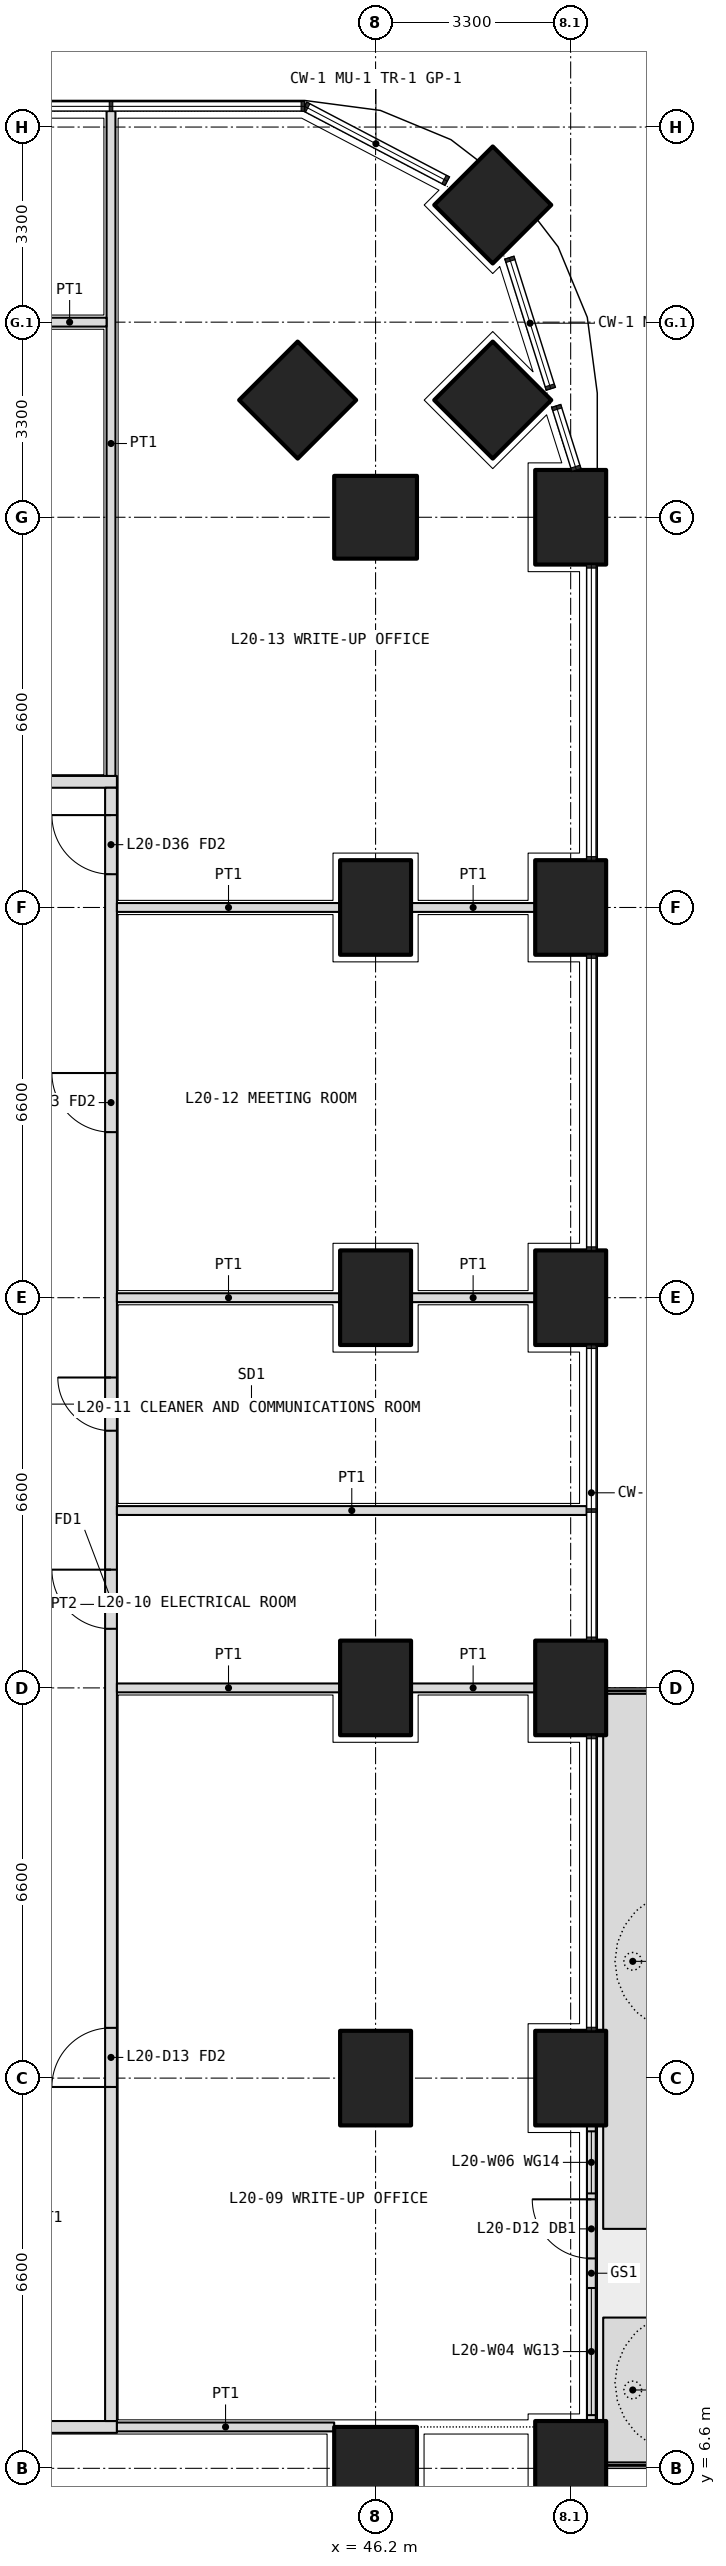
"""IFC4 building model, lengths in metres.
Left out: names, types, materials, properties, quantities, classifications, styles, units other than length and angle.
Written with IfcOpenShell. Run it as: python <this file> out.ifc"""

import sys

from ifc_helpers import new_model, si_unit, direction, frame, frame_2d, origin, origin_2d, place, context, subcontext, project, spatial, polyline, rectangle, outline, extrude, element, fill, save


model = new_model("IFC4")
c1 = context("Model", 3, precision=1e-05, world=origin(), true_north=direction((0.0, 1.0)))
c2 = subcontext(c1, "Body", "Model", "MODEL_VIEW")
j1 = project(units=[si_unit("LENGTHUNIT", "METRE"), si_unit("PLANEANGLEUNIT", "RADIAN")], contexts=[c1])
p1 = place(None, origin())
s1 = spatial("IfcSite", under=j1, at=p1, CompositionType="ELEMENT")
p2 = place(p1, origin())
s2 = spatial("IfcBuilding", under=s1, at=p2, CompositionType="ELEMENT")
p3 = place(p2, frame((0.0, 0.0, 90.6)))
s3 = spatial("IfcBuildingStorey", under=s2, at=p3, CompositionType="ELEMENT", Elevation=90.6)
p4 = place(p3, frame((48.182, 44.882, 0.0), z_axis=(0.0, 0.0, 1.0), x_axis=(0.707106781187, 0.707106781187, 0.0)))
e1 = element("IfcColumn", 1, at=p4, inside=s3, PredefinedType="COLUMN", context=c2, shape_type="SweptSolid", body=[
    extrude(rectangle(XDim=1.4, YDim=1.4, at=origin_2d()), origin(), (0.0, 0.0, 1.0), 4.2),
])
for number, where, z_axis, x_axis in (
    (2, (49.5, 6.6, 0.0), (0.0, 0.0, 1.0), (0.0, 1.0, 0.0)),
    (3, (49.5, 13.2, 0.0), (0.0, 0.0, 1.0), (0.0, 1.0, 0.0)),
    (4, (49.5, 19.8, 0.0), (0.0, 0.0, 1.0), (0.0, 1.0, 0.0)),
    (5, (49.5, 26.4, 0.0), (0.0, 0.0, 1.0), (0.0, 1.0, 0.0)),
    (6, (49.5, 33.0, 0.0), (0.0, 0.0, 1.0), (0.0, 1.0, 0.0)),
    (7, (49.5, 39.6, 0.0), (0.0, 0.0, 1.0), (0.0, 1.0, 0.0)),
):
    element("IfcColumn", number, at=place(p3, frame(where, z_axis=z_axis, x_axis=x_axis)), inside=s3, PredefinedType="COLUMN", context=c2, shape_type="SweptSolid", body=[
        extrude(rectangle(XDim=1.6, YDim=1.2, at=origin_2d()), origin(), (0.0, 0.0, 1.0), 4.2),
    ])
for number, where, z_axis, x_axis in (
    (8, (46.2, 6.6, 0.0), (0.0, 0.0, 1.0), (1.0, 0.0, 0.0)),
    (9, (46.2, 39.6, 0.0), (0.0, 0.0, 1.0), (1.0, 0.0, 0.0)),
    (10, (48.182, 41.582, 0.0), (0.0, 0.0, 1.0), (0.707, 0.707, 0.0)),
    (11, (44.882, 41.582, 0.0), (0.0, 0.0, 1.0), (0.707, 0.707, 0.0)),
):
    element("IfcColumn", number, at=place(p3, frame(where, z_axis=z_axis, x_axis=x_axis)), inside=s3, PredefinedType="COLUMN", context=c2, shape_type="SweptSolid", body=[
        extrude(rectangle(XDim=1.4, YDim=1.4, at=origin_2d()), origin(), (0.0, 0.0, 1.0), 4.2),
    ])
for number, where, z_axis, x_axis in (
    (12, (46.2, 13.2, 0.0), (0.0, 0.0, 1.0), (0.0, 1.0, 0.0)),
    (13, (46.2, 19.8, 0.0), (0.0, 0.0, 1.0), (0.0, 1.0, 0.0)),
    (14, (46.2, 26.4, 0.0), (0.0, 0.0, 1.0), (0.0, 1.0, 0.0)),
    (15, (46.2, 33.0, 0.0), (0.0, 0.0, 1.0), (0.0, 1.0, 0.0)),
):
    element("IfcColumn", number, at=place(p3, frame(where, z_axis=z_axis, x_axis=x_axis)), inside=s3, PredefinedType="COLUMN", context=c2, shape_type="SweptSolid", body=[
        extrude(rectangle(XDim=1.6, YDim=1.2, at=origin_2d()), origin(), (0.0, 0.0, 1.0), 4.2),
    ])
p5 = place(p3, origin())
e16 = element("IfcWall", 16, at=p5, inside=s3, PredefinedType="USERDEFINED", context=c2, shape_type="SweptSolid", body=[
    extrude(outline(polyline([(50.05, 6.7), (51.05, 6.7), (51.05, 9.15), (50.05, 9.15), (50.05, 6.7)]), holes=[polyline([(50.2, 6.85), (50.9, 6.85), (50.9, 9.0), (50.2, 9.0), (50.2, 6.85)])]), origin(), (0.0, 0.0, 1.0), 1.05),
])
p6 = place(p3, origin())
e17 = element("IfcWall", 17, at=p6, inside=s3, PredefinedType="USERDEFINED", context=c2, shape_type="SweptSolid", body=[
    extrude(outline(polyline([(50.05, 10.65), (51.05, 10.65), (51.05, 19.7), (50.05, 19.7), (50.05, 10.65)]), holes=[polyline([(50.2, 10.8), (50.9, 10.8), (50.9, 19.55), (50.2, 19.55), (50.2, 10.8)])]), origin(), (0.0, 0.0, 1.0), 1.05),
])
p7 = place(p3, frame((49.85, 7.4, 0.0), z_axis=(0.0, 0.0, 1.0), x_axis=(0.0, 1.0, 0.0)))
e18 = element("IfcWall", 18, at=p7, inside=s3, PredefinedType="SOLIDWALL", context=c2, shape_type="SweptSolid", body=[
    extrude(rectangle(XDim=5.0, YDim=0.15, at=frame_2d((2.5, 0.0))), origin(), (0.0, 0.0, 1.0), 2.7),
])
p8 = place(p7, frame((2.75, 0.0, 0.0)))
e19 = element("IfcOpeningElement", 19, at=p8, cuts=e18, PredefinedType="OPENING", context=c2, shape_type="SweptSolid", body=[
    extrude(rectangle(XDim=1.0, YDim=2.4, at=frame_2d((0.5, 1.2))), frame((0.0, 0.085, 0.0), z_axis=(0.0, -1.0, 0.0), x_axis=(1.0, 0.0, 0.0)), (0.0, 0.0, 1.0), 0.17),
])
p9 = place(p7, frame((0.1, 0.0, 0.1)))
e20 = element("IfcOpeningElement", 20, at=p9, cuts=e18, PredefinedType="OPENING", context=c2, shape_type="SweptSolid", body=[
    extrude(rectangle(XDim=2.15, YDim=2.3, at=frame_2d((1.075, 1.15))), frame((0.0, 0.085, 0.0), z_axis=(0.0, -1.0, 0.0), x_axis=(1.0, 0.0, 0.0)), (0.0, 0.0, 1.0), 0.17),
])
p10 = place(p7, frame((3.85, 0.0, 0.1)))
e21 = element("IfcOpeningElement", 21, at=p10, cuts=e18, PredefinedType="OPENING", context=c2, shape_type="SweptSolid", body=[
    extrude(rectangle(XDim=1.05, YDim=2.3, at=frame_2d((0.525, 1.15))), frame((0.0, 0.085, 0.0), z_axis=(0.0, -1.0, 0.0), x_axis=(1.0, 0.0, 0.0)), (0.0, 0.0, 1.0), 0.17),
])
p11 = place(p3, frame((26.4, 7.3, 0.0), z_axis=(0.0, 0.0, 1.0), x_axis=(1.0, 0.0, 0.0)))
e22 = element("IfcWall", 22, at=p11, inside=s3, PredefinedType="PARTITIONING", context=c2, shape_type="SweptSolid", body=[
    extrude(rectangle(XDim=15.425, YDim=0.2, at=frame_2d((7.712, 0.0))), origin(), (0.0, 0.0, 1.0), 2.85),
])
p12 = place(p11, frame((7.163, 0.0, 0.0)))
e23 = element("IfcOpeningElement", 23, at=p12, cuts=e22, PredefinedType="OPENING", context=c2, shape_type="SweptSolid", body=[
    extrude(rectangle(XDim=1.0, YDim=2.1, at=frame_2d((0.5, 1.05))), frame((0.0, 0.11, 0.0), z_axis=(0.0, -1.0, 0.0), x_axis=(1.0, 0.0, 0.0)), (0.0, 0.0, 1.0), 0.22),
])
p13 = place(p3, frame((10.975, 35.125, 0.0), z_axis=(0.0, 0.0, 1.0), x_axis=(1.0, 0.0, 0.0)))
e24 = element("IfcWall", 24, at=p13, inside=s3, PredefinedType="PARTITIONING", context=c2, shape_type="SweptSolid", body=[
    extrude(rectangle(XDim=30.85, YDim=0.2, at=frame_2d((15.425, 0.0))), origin(), (0.0, 0.0, 1.0), 2.85),
])
p14 = place(p13, frame((3.962, 0.0, 0.0)))
e25 = element("IfcOpeningElement", 25, at=p14, cuts=e24, PredefinedType="OPENING", context=c2, shape_type="SweptSolid", body=[
    extrude(rectangle(XDim=1.0, YDim=2.1, at=frame_2d((0.5, 1.05))), frame((0.0, 0.11, 0.0), z_axis=(0.0, -1.0, 0.0), x_axis=(1.0, 0.0, 0.0)), (0.0, 0.0, 1.0), 0.22),
])
p15 = place(p13, frame((9.975, 0.0, 0.0)))
e26 = element("IfcOpeningElement", 26, at=p15, cuts=e24, PredefinedType="OPENING", context=c2, shape_type="SweptSolid", body=[
    extrude(rectangle(XDim=1.0, YDim=2.1, at=frame_2d((0.5, 1.05))), frame((0.0, 0.11, 0.0), z_axis=(0.0, -1.0, 0.0), x_axis=(1.0, 0.0, 0.0)), (0.0, 0.0, 1.0), 0.22),
])
p16 = place(p13, frame((14.825, 0.0, 0.0)))
e27 = element("IfcOpeningElement", 27, at=p16, cuts=e24, PredefinedType="OPENING", context=c2, shape_type="SweptSolid", body=[
    extrude(rectangle(XDim=1.2, YDim=2.1, at=frame_2d((0.6, 1.05))), frame((0.0, 0.11, 0.0), z_axis=(0.0, -1.0, 0.0), x_axis=(1.0, 0.0, 0.0)), (0.0, 0.0, 1.0), 0.22),
])
p17 = place(p13, frame((24.238, 0.0, 0.0)))
e28 = element("IfcOpeningElement", 28, at=p17, cuts=e24, PredefinedType="OPENING", context=c2, shape_type="SweptSolid", body=[
    extrude(rectangle(XDim=1.0, YDim=2.1, at=frame_2d((0.5, 1.05))), frame((0.0, 0.11, 0.0), z_axis=(0.0, -1.0, 0.0), x_axis=(1.0, 0.0, 0.0)), (0.0, 0.0, 1.0), 0.22),
])
p18 = place(p3, frame((41.725, 7.4, 0.0), z_axis=(0.0, 0.0, 1.0), x_axis=(0.0, 1.0, 0.0)))
e29 = element("IfcWall", 29, at=p18, inside=s3, PredefinedType="PARTITIONING", context=c2, shape_type="SweptSolid", body=[
    extrude(rectangle(XDim=27.625, YDim=0.2, at=frame_2d((13.812, 0.0))), origin(), (0.0, 0.0, 1.0), 2.85),
])
p19 = place(p18, frame((5.65, 0.0, 0.0)))
e30 = element("IfcOpeningElement", 30, at=p19, cuts=e29, PredefinedType="OPENING", context=c2, shape_type="SweptSolid", body=[
    extrude(rectangle(XDim=1.0, YDim=2.1, at=frame_2d((0.5, 1.05))), frame((0.0, 0.11, 0.0), z_axis=(0.0, -1.0, 0.0), x_axis=(1.0, 0.0, 0.0)), (0.0, 0.0, 1.0), 0.22),
])
p20 = place(p18, frame((13.4, 0.0, 0.0)))
e31 = element("IfcOpeningElement", 31, at=p20, cuts=e29, PredefinedType="OPENING", context=c2, shape_type="SweptSolid", body=[
    extrude(rectangle(XDim=1.0, YDim=2.1, at=frame_2d((0.5, 1.05))), frame((0.0, 0.11, 0.0), z_axis=(0.0, -1.0, 0.0), x_axis=(1.0, 0.0, 0.0)), (0.0, 0.0, 1.0), 0.22),
])
p21 = place(p18, frame((16.75, 0.0, 0.0)))
e32 = element("IfcOpeningElement", 32, at=p21, cuts=e29, PredefinedType="OPENING", context=c2, shape_type="SweptSolid", body=[
    extrude(rectangle(XDim=0.9, YDim=2.1, at=frame_2d((0.45, 1.05))), frame((0.0, 0.11, 0.0), z_axis=(0.0, -1.0, 0.0), x_axis=(1.0, 0.0, 0.0)), (0.0, 0.0, 1.0), 0.22),
])
p22 = place(p18, frame((21.8, 0.0, 0.0)))
e33 = element("IfcOpeningElement", 33, at=p22, cuts=e29, PredefinedType="OPENING", context=c2, shape_type="SweptSolid", body=[
    extrude(rectangle(XDim=1.0, YDim=2.1, at=frame_2d((0.5, 1.05))), frame((0.0, 0.11, 0.0), z_axis=(0.0, -1.0, 0.0), x_axis=(1.0, 0.0, 0.0)), (0.0, 0.0, 1.0), 0.22),
])
p23 = place(p18, frame((26.163, 0.0, 0.0)))
e34 = element("IfcOpeningElement", 34, at=p23, cuts=e29, PredefinedType="OPENING", context=c2, shape_type="SweptSolid", body=[
    extrude(rectangle(XDim=1.0, YDim=2.1, at=frame_2d((0.5, 1.05))), frame((0.0, 0.11, 0.0), z_axis=(0.0, -1.0, 0.0), x_axis=(1.0, 0.0, 0.0)), (0.0, 0.0, 1.0), 0.22),
])
p24 = place(p3, frame((45.5, 7.3, 0.0), z_axis=(0.0, 0.0, 1.0), x_axis=(-1.0, 0.0, 0.0)))
e35 = element("IfcWall", 35, at=p24, inside=s3, PredefinedType="PARTITIONING", context=c2, shape_type="SweptSolid", body=[
    extrude(rectangle(XDim=3.675, YDim=0.15, at=frame_2d((1.837, 0.0))), origin(), (0.0, 0.0, 1.0), 2.85),
])
p25 = place(p3, frame((41.725, 46.47, 0.0), z_axis=(0.0, 0.0, 1.0), x_axis=(0.0, -1.0, 0.0)))
e36 = element("IfcWall", 36, at=p25, inside=s3, PredefinedType="PARTITIONING", context=c2, shape_type="SweptSolid", body=[
    extrude(rectangle(XDim=11.245, YDim=0.15, at=frame_2d((5.623, 0.0))), origin(), (0.0, 0.0, 1.0), 2.7),
])
p26 = place(p3, frame((49.77, 22.8, 0.0), z_axis=(0.0, 0.0, 1.0), x_axis=(-1.0, 0.0, 0.0)))
e37 = element("IfcWall", 37, at=p26, inside=s3, PredefinedType="PARTITIONING", context=c2, shape_type="SweptSolid", body=[
    extrude(rectangle(XDim=7.945, YDim=0.15, at=frame_2d((3.973, 0.0))), origin(), (0.0, 0.0, 1.0), 2.7),
])
p27 = place(p3, frame((48.9, 26.4, 0.0), z_axis=(0.0, 0.0, 1.0), x_axis=(-1.0, 0.0, 0.0)))
e38 = element("IfcWall", 38, at=p27, inside=s3, PredefinedType="PARTITIONING", context=c2, shape_type="SweptSolid", body=[
    extrude(rectangle(XDim=2.1, YDim=0.15, at=frame_2d((1.05, 0.0))), origin(), (0.0, 0.0, 1.0), 2.85),
])
p28 = place(p3, frame((45.6, 26.4, 0.0), z_axis=(0.0, 0.0, 1.0), x_axis=(-1.0, 0.0, 0.0)))
e39 = element("IfcWall", 39, at=p28, inside=s3, PredefinedType="PARTITIONING", context=c2, shape_type="SweptSolid", body=[
    extrude(rectangle(XDim=3.775, YDim=0.15, at=frame_2d((1.888, 0.0))), origin(), (0.0, 0.0, 1.0), 2.85),
])
p29 = place(p3, frame((48.9, 19.8, 0.0), z_axis=(0.0, 0.0, 1.0), x_axis=(-1.0, 0.0, 0.0)))
e40 = element("IfcWall", 40, at=p29, inside=s3, PredefinedType="PARTITIONING", context=c2, shape_type="SweptSolid", body=[
    extrude(rectangle(XDim=2.1, YDim=0.15, at=frame_2d((1.05, 0.0))), origin(), (0.0, 0.0, 1.0), 2.85),
])
p30 = place(p3, frame((45.6, 19.8, 0.0), z_axis=(0.0, 0.0, 1.0), x_axis=(-1.0, 0.0, 0.0)))
e41 = element("IfcWall", 41, at=p30, inside=s3, PredefinedType="PARTITIONING", context=c2, shape_type="SweptSolid", body=[
    extrude(rectangle(XDim=3.775, YDim=0.15, at=frame_2d((1.888, 0.0))), origin(), (0.0, 0.0, 1.0), 2.85),
])
p31 = place(p3, frame((48.9, 33.0, 0.0), z_axis=(0.0, 0.0, 1.0), x_axis=(-1.0, 0.0, 0.0)))
e42 = element("IfcWall", 42, at=p31, inside=s3, PredefinedType="PARTITIONING", context=c2, shape_type="SweptSolid", body=[
    extrude(rectangle(XDim=2.1, YDim=0.15, at=frame_2d((1.05, 0.0))), origin(), (0.0, 0.0, 1.0), 2.85),
])
p32 = place(p3, frame((45.6, 33.0, 0.0), z_axis=(0.0, 0.0, 1.0), x_axis=(-1.0, 0.0, 0.0)))
e43 = element("IfcWall", 43, at=p32, inside=s3, PredefinedType="PARTITIONING", context=c2, shape_type="SweptSolid", body=[
    extrude(rectangle(XDim=3.775, YDim=0.15, at=frame_2d((1.888, 0.0))), origin(), (0.0, 0.0, 1.0), 2.85),
])
p33 = place(p3, frame((41.65, 42.9, 0.0), z_axis=(0.0, 0.0, 1.0), x_axis=(-1.0, 0.0, 0.0)))
e44 = element("IfcWall", 44, at=p33, inside=s3, PredefinedType="PARTITIONING", context=c2, shape_type="SweptSolid", body=[
    extrude(rectangle(XDim=1.25, YDim=0.15, at=frame_2d((0.625, 0.0))), origin(), (0.0, 0.0, 1.0), 3.9),
])
p34 = place(p8, origin())
e45 = element("IfcDoor", 45, at=p34, inside=s3, OperationType="SINGLE_SWING_RIGHT", PredefinedType="DOOR", context=c2, shape_type="SweptSolid", body=[
    extrude(rectangle(XDim=1.0, YDim=2.4, at=frame_2d((0.5, 1.2))), frame((0.0, 0.025, 0.0), z_axis=(0.0, -1.0, 0.0), x_axis=(1.0, 0.0, 0.0)), (0.0, 0.0, 1.0), 0.05),
])
fill(e19, e45)
p35 = place(p9, origin())
e46 = element("IfcWindow", 46, at=p35, inside=s3, PartitioningType="SINGLE_PANEL", PredefinedType="WINDOW", context=c2, shape_type="SweptSolid", body=[
    extrude(rectangle(XDim=2.15, YDim=2.3, at=frame_2d((1.075, 1.15))), frame((0.0, 0.03, 0.0), z_axis=(0.0, -1.0, 0.0), x_axis=(1.0, 0.0, 0.0)), (0.0, 0.0, 1.0), 0.06),
])
fill(e20, e46)
p36 = place(p10, origin())
e47 = element("IfcWindow", 47, at=p36, inside=s3, PartitioningType="SINGLE_PANEL", PredefinedType="WINDOW", context=c2, shape_type="SweptSolid", body=[
    extrude(rectangle(XDim=1.05, YDim=2.3, at=frame_2d((0.525, 1.15))), frame((0.0, 0.03, 0.0), z_axis=(0.0, -1.0, 0.0), x_axis=(1.0, 0.0, 0.0)), (0.0, 0.0, 1.0), 0.06),
])
fill(e21, e47)
p37 = place(p19, origin())
e48 = element("IfcDoor", 48, at=p37, inside=s3, OperationType="SINGLE_SWING_LEFT", PredefinedType="DOOR", context=c2, shape_type="SweptSolid", body=[
    extrude(rectangle(XDim=1.0, YDim=2.1, at=frame_2d((0.5, 1.05))), frame((0.0, 0.025, 0.0), z_axis=(0.0, -1.0, 0.0), x_axis=(1.0, 0.0, 0.0)), (0.0, 0.0, 1.0), 0.05),
])
fill(e30, e48)
p38 = place(p20, origin())
e49 = element("IfcDoor", 49, at=p38, inside=s3, OperationType="SINGLE_SWING_RIGHT", PredefinedType="DOOR", context=c2, shape_type="SweptSolid", body=[
    extrude(rectangle(XDim=1.0, YDim=2.1, at=frame_2d((0.5, 1.05))), frame((0.0, 0.025, 0.0), z_axis=(0.0, -1.0, 0.0), x_axis=(1.0, 0.0, 0.0)), (0.0, 0.0, 1.0), 0.05),
])
fill(e31, e49)
p39 = place(p21, origin())
e50 = element("IfcDoor", 50, at=p39, inside=s3, OperationType="SINGLE_SWING_RIGHT", PredefinedType="DOOR", context=c2, shape_type="SweptSolid", body=[
    extrude(rectangle(XDim=0.9, YDim=2.1, at=frame_2d((0.45, 1.05))), frame((0.0, 0.025, 0.0), z_axis=(0.0, -1.0, 0.0), x_axis=(1.0, 0.0, 0.0)), (0.0, 0.0, 1.0), 0.05),
])
fill(e32, e50)
p40 = place(p22, origin())
e51 = element("IfcDoor", 51, at=p40, inside=s3, OperationType="SINGLE_SWING_RIGHT", PredefinedType="DOOR", context=c2, shape_type="SweptSolid", body=[
    extrude(rectangle(XDim=1.0, YDim=2.1, at=frame_2d((0.5, 1.05))), frame((0.0, 0.025, 0.0), z_axis=(0.0, -1.0, 0.0), x_axis=(1.0, 0.0, 0.0)), (0.0, 0.0, 1.0), 0.05),
])
fill(e33, e51)
p41 = place(p23, origin())
e52 = element("IfcDoor", 52, at=p41, inside=s3, OperationType="SINGLE_SWING_RIGHT", PredefinedType="DOOR", context=c2, shape_type="SweptSolid", body=[
    extrude(rectangle(XDim=1.0, YDim=2.1, at=frame_2d((0.5, 1.05))), frame((0.0, 0.025, 0.0), z_axis=(0.0, -1.0, 0.0), x_axis=(1.0, 0.0, 0.0)), (0.0, 0.0, 1.0), 0.05),
])
fill(e34, e52)
save(model, sys.argv[1])
